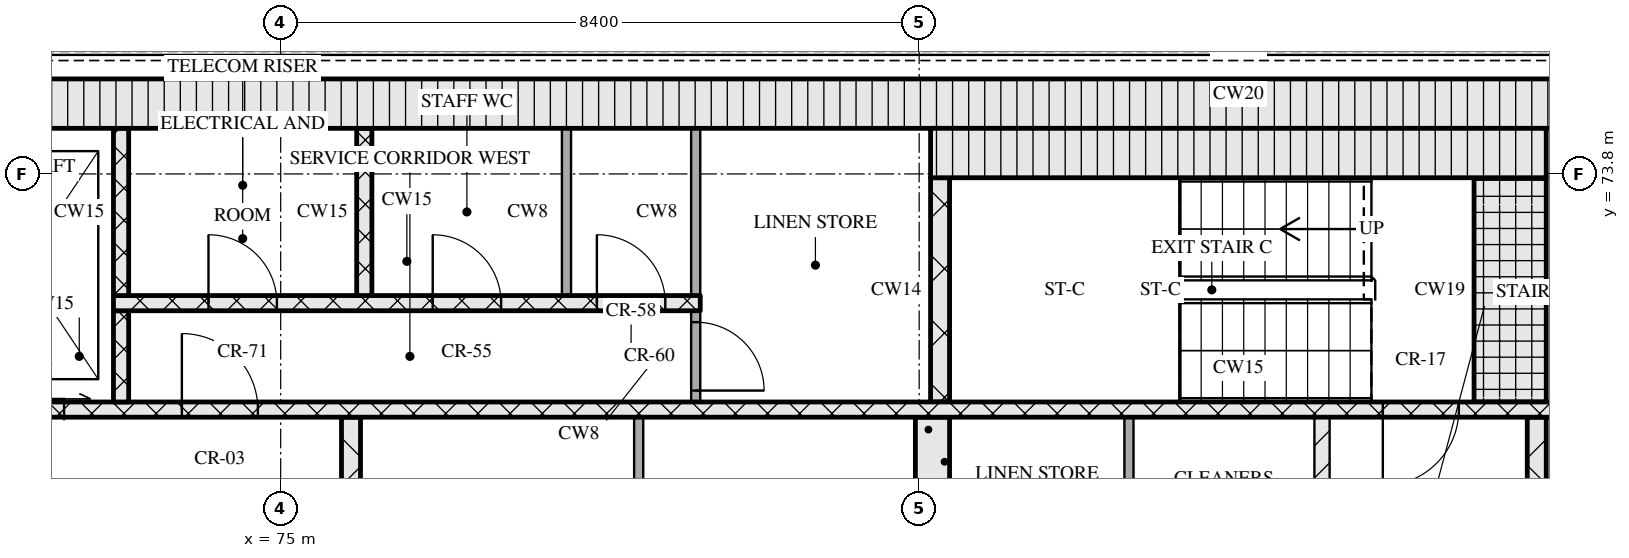
"""IFC4 building model, lengths in metres.
Left out: names, types, materials, properties, quantities, classifications, styles, units other than length and angle.
Written with IfcOpenShell. Run it as: python <this file> out.ifc"""

import sys

from ifc_helpers import new_model, si_unit, direction, frame, frame_2d, origin, place, context, subcontext, project, spatial, rectangle, extrude, element, fill, save


model = new_model("IFC4")
c1 = context("Model", 3, precision=1e-05, world=origin(), true_north=direction((0.0, 1.0)))
c2 = subcontext(c1, "Body", "Model", "MODEL_VIEW")
j1 = project(units=[si_unit("LENGTHUNIT", "METRE"), si_unit("PLANEANGLEUNIT", "RADIAN")], contexts=[c1])
p1 = place(None, origin())
s1 = spatial("IfcSite", under=j1, at=p1, CompositionType="ELEMENT")
p2 = place(p1, origin())
s2 = spatial("IfcBuilding", under=s1, at=p2, CompositionType="ELEMENT")
p3 = place(p2, frame((0.0, 0.0, 234.3)))
s3 = spatial("IfcBuildingStorey", under=s2, at=p3, CompositionType="ELEMENT", Elevation=234.3)
p4 = place(p3, frame((67.15, 74.725, 0.0), z_axis=(0.0, 0.0, 1.0), x_axis=(1.0, 0.0, 0.0)))
e1 = element("IfcWall", 1, at=p4, inside=s3, PredefinedType="SOLIDWALL", context=c2, shape_type="SweptSolid", body=[
    extrude(rectangle(XDim=40.9, YDim=0.65, at=frame_2d((20.45, 0.0))), origin(), (0.0, 0.0, 1.0), 3.32),
])
p5 = place(p3, frame((79.71, 68.0, 0.0), z_axis=(0.0, 0.0, 1.0), x_axis=(0.0, 1.0, 0.0)))
e2 = element("IfcWall", 2, at=p5, inside=s3, PredefinedType="PARTITIONING", context=c2, shape_type="SweptSolid", body=[
    extrude(rectangle(XDim=2.6, YDim=0.12, at=frame_2d((1.3, 0.0))), origin(), (0.0, 0.0, 1.0), 3.32),
])
p6 = place(p3, frame((83.575, 68.0, 0.0), z_axis=(0.0, 0.0, 1.0), x_axis=(0.0, 1.0, 0.0)))
e3 = element("IfcWall", 3, at=p6, inside=s3, PredefinedType="SOLIDWALL", context=c2, shape_type="SweptSolid", body=[
    extrude(rectangle(XDim=2.6, YDim=0.45, at=frame_2d((1.3, 0.0))), origin(), (0.0, 0.0, 1.0), 3.32),
])
p7 = place(p3, frame((86.16, 68.0, 0.0), z_axis=(0.0, 0.0, 1.0), x_axis=(0.0, 1.0, 0.0)))
e4 = element("IfcWall", 4, at=p7, inside=s3, PredefinedType="PARTITIONING", context=c2, shape_type="SweptSolid", body=[
    extrude(rectangle(XDim=2.6, YDim=0.12, at=frame_2d((1.3, 0.0))), origin(), (0.0, 0.0, 1.0), 3.32),
])
p8 = place(p3, frame((88.7, 68.0, 0.0), z_axis=(0.0, 0.0, 1.0), x_axis=(0.0, 1.0, 0.0)))
e5 = element("IfcWall", 5, at=p8, inside=s3, PredefinedType="PARTITIONING", context=c2, shape_type="SweptSolid", body=[
    extrude(rectangle(XDim=2.6, YDim=0.2, at=frame_2d((1.3, 0.0))), origin(), (0.0, 0.0, 1.0), 3.32),
])
p9 = place(p3, frame((91.525, 68.0, 0.0), z_axis=(0.0, 0.0, 1.0), x_axis=(0.0, 1.0, 0.0)))
e6 = element("IfcWall", 6, at=p9, inside=s3, PredefinedType="SOLIDWALL", context=c2, shape_type="SweptSolid", body=[
    extrude(rectangle(XDim=2.6, YDim=0.25, at=frame_2d((1.3, 0.0))), origin(), (0.0, 0.0, 1.0), 3.32),
])
p10 = place(p3, frame((75.925, 68.3, 0.0), z_axis=(0.0, 0.0, 1.0), x_axis=(0.0, 1.0, 0.0)))
e7 = element("IfcWall", 7, at=p10, inside=s3, PredefinedType="SOLIDWALL", context=c2, shape_type="SweptSolid", body=[
    extrude(rectangle(XDim=2.3, YDim=0.25, at=frame_2d((1.15, 0.0))), origin(), (0.0, 0.0, 1.0), 3.32),
])
p11 = place(p3, frame((67.8, 70.7, 0.0), z_axis=(0.0, 0.0, 1.0), x_axis=(1.0, 0.0, 0.0)))
e8 = element("IfcWall", 8, at=p11, inside=s3, PredefinedType="SOLIDWALL", context=c2, shape_type="SweptSolid", body=[
    extrude(rectangle(XDim=39.6, YDim=0.2, at=frame_2d((19.8, 0.0))), origin(), (0.0, 0.0, 1.0), 3.32),
])
p12 = place(p11, frame((0.65, 0.0, 0.0)))
e9 = element("IfcOpeningElement", 9, at=p12, cuts=e8, PredefinedType="OPENING", context=c2, shape_type="SweptSolid", body=[
    extrude(rectangle(XDim=1.1, YDim=2.1, at=frame_2d((0.55, 1.05))), frame((0.0, 0.11, 0.0), z_axis=(0.0, -1.0, 0.0), x_axis=(1.0, 0.0, 0.0)), (0.0, 0.0, 1.0), 0.22),
])
p13 = place(p11, frame((3.25, 0.0, 0.0)))
e10 = element("IfcOpeningElement", 10, at=p13, cuts=e8, PredefinedType="OPENING", context=c2, shape_type="SweptSolid", body=[
    extrude(rectangle(XDim=1.1, YDim=2.1, at=frame_2d((0.55, 1.05))), frame((0.0, 0.11, 0.0), z_axis=(0.0, -1.0, 0.0), x_axis=(1.0, 0.0, 0.0)), (0.0, 0.0, 1.0), 0.22),
])
p14 = place(p11, frame((5.9, 0.0, 0.0)))
e11 = element("IfcOpeningElement", 11, at=p14, cuts=e8, PredefinedType="OPENING", context=c2, shape_type="SweptSolid", body=[
    extrude(rectangle(XDim=1.0, YDim=2.1, at=frame_2d((0.5, 1.05))), frame((0.0, 0.11, 0.0), z_axis=(0.0, -1.0, 0.0), x_axis=(1.0, 0.0, 0.0)), (0.0, 0.0, 1.0), 0.22),
])
p15 = place(p11, frame((21.7, 0.0, 0.0)))
e12 = element("IfcOpeningElement", 12, at=p15, cuts=e8, PredefinedType="OPENING", context=c2, shape_type="SweptSolid", body=[
    extrude(rectangle(XDim=1.0, YDim=2.1, at=frame_2d((0.5, 1.05))), frame((0.0, 0.11, 0.0), z_axis=(0.0, -1.0, 0.0), x_axis=(1.0, 0.0, 0.0)), (0.0, 0.0, 1.0), 0.22),
])
p16 = place(p11, frame((32.7, 0.0, 0.0)))
e13 = element("IfcOpeningElement", 13, at=p16, cuts=e8, PredefinedType="OPENING", context=c2, shape_type="SweptSolid", body=[
    extrude(rectangle(XDim=1.0, YDim=2.1, at=frame_2d((0.5, 1.05))), frame((0.0, 0.11, 0.0), z_axis=(0.0, -1.0, 0.0), x_axis=(1.0, 0.0, 0.0)), (0.0, 0.0, 1.0), 0.22),
])
p17 = place(p11, frame((35.25, 0.0, 0.0)))
e14 = element("IfcOpeningElement", 14, at=p17, cuts=e8, PredefinedType="OPENING", context=c2, shape_type="SweptSolid", body=[
    extrude(rectangle(XDim=1.1, YDim=2.1, at=frame_2d((0.55, 1.05))), frame((0.0, 0.11, 0.0), z_axis=(0.0, -1.0, 0.0), x_axis=(1.0, 0.0, 0.0)), (0.0, 0.0, 1.0), 0.22),
])
p18 = place(p11, frame((37.85, 0.0, 0.0)))
e15 = element("IfcOpeningElement", 15, at=p18, cuts=e8, PredefinedType="OPENING", context=c2, shape_type="SweptSolid", body=[
    extrude(rectangle(XDim=1.1, YDim=2.1, at=frame_2d((0.55, 1.05))), frame((0.0, 0.11, 0.0), z_axis=(0.0, -1.0, 0.0), x_axis=(1.0, 0.0, 0.0)), (0.0, 0.0, 1.0), 0.22),
])
p19 = place(p3, frame((72.9, 70.8, 0.0), z_axis=(0.0, 0.0, 1.0), x_axis=(0.0, 1.0, 0.0)))
e16 = element("IfcWall", 16, at=p19, inside=s3, PredefinedType="SOLIDWALL", context=c2, shape_type="SweptSolid", body=[
    extrude(rectangle(XDim=1.2, YDim=0.2, at=frame_2d((0.6, 0.0))), origin(), (0.0, 0.0, 1.0), 3.32),
])
p20 = place(p3, frame((80.46, 70.8, 0.0), z_axis=(0.0, 0.0, 1.0), x_axis=(0.0, 1.0, 0.0)))
e17 = element("IfcWall", 17, at=p20, inside=s3, PredefinedType="PARTITIONING", context=c2, shape_type="SweptSolid", body=[
    extrude(rectangle(XDim=1.2, YDim=0.12, at=frame_2d((0.6, 0.0))), origin(), (0.0, 0.0, 1.0), 3.32),
])
p21 = place(p20, frame((0.15, 0.0, 0.0)))
e18 = element("IfcOpeningElement", 18, at=p21, cuts=e17, PredefinedType="OPENING", context=c2, shape_type="SweptSolid", body=[
    extrude(rectangle(XDim=0.9, YDim=2.1, at=frame_2d((0.45, 1.05))), frame((0.0, 0.07, 0.0), z_axis=(0.0, -1.0, 0.0), x_axis=(1.0, 0.0, 0.0)), (0.0, 0.0, 1.0), 0.14),
])
p22 = place(p3, frame((83.675, 70.8, 0.0), z_axis=(0.0, 0.0, 1.0), x_axis=(0.0, 1.0, 0.0)))
e19 = element("IfcWall", 19, at=p22, inside=s3, PredefinedType="SOLIDWALL", context=c2, shape_type="SweptSolid", body=[
    extrude(rectangle(XDim=2.95, YDim=0.25, at=frame_2d((1.475, 0.0))), origin(), (0.0, 0.0, 1.0), 3.32),
])
p23 = place(p3, frame((91.175, 70.8, 0.0), z_axis=(0.0, 0.0, 1.0), x_axis=(0.0, 1.0, 0.0)))
e20 = element("IfcWall", 20, at=p23, inside=s3, PredefinedType="SOLIDWALL", context=c2, shape_type="SweptSolid", body=[
    extrude(rectangle(XDim=2.95, YDim=0.95, at=frame_2d((1.475, 0.0))), origin(), (0.0, 0.0, 1.0), 3.32),
])
p24 = place(p3, frame((72.8, 72.1, 0.0), z_axis=(0.0, 0.0, 1.0), x_axis=(1.0, 0.0, 0.0)))
e21 = element("IfcWall", 21, at=p24, inside=s3, PredefinedType="SOLIDWALL", context=c2, shape_type="SweptSolid", body=[
    extrude(rectangle(XDim=7.72, YDim=0.2, at=frame_2d((3.86, 0.0))), origin(), (0.0, 0.0, 1.0), 3.32),
])
p25 = place(p24, frame((1.25, 0.0, 0.0)))
e22 = element("IfcOpeningElement", 22, at=p25, cuts=e21, PredefinedType="OPENING", context=c2, shape_type="SweptSolid", body=[
    extrude(rectangle(XDim=0.9, YDim=2.1, at=frame_2d((0.45, 1.05))), frame((0.0, 0.11, 0.0), z_axis=(0.0, -1.0, 0.0), x_axis=(1.0, 0.0, 0.0)), (0.0, 0.0, 1.0), 0.22),
])
p26 = place(p24, frame((4.2, 0.0, 0.0)))
e23 = element("IfcOpeningElement", 23, at=p26, cuts=e21, PredefinedType="OPENING", context=c2, shape_type="SweptSolid", body=[
    extrude(rectangle(XDim=0.9, YDim=2.1, at=frame_2d((0.45, 1.05))), frame((0.0, 0.11, 0.0), z_axis=(0.0, -1.0, 0.0), x_axis=(1.0, 0.0, 0.0)), (0.0, 0.0, 1.0), 0.22),
])
p27 = place(p24, frame((6.36, 0.0, 0.0)))
e24 = element("IfcOpeningElement", 24, at=p27, cuts=e21, PredefinedType="OPENING", context=c2, shape_type="SweptSolid", body=[
    extrude(rectangle(XDim=0.9, YDim=2.1, at=frame_2d((0.45, 1.05))), frame((0.0, 0.11, 0.0), z_axis=(0.0, -1.0, 0.0), x_axis=(1.0, 0.0, 0.0)), (0.0, 0.0, 1.0), 0.22),
])
for number, where, z_axis, x_axis in (
    (25, (72.9, 72.2, 0.0), (0.0, 0.0, 1.0), (0.0, 1.0, 0.0)),
    (26, (76.1, 72.2, 0.0), (0.0, 0.0, 1.0), (0.0, 1.0, 0.0)),
):
    element("IfcWall", number, at=place(p3, frame(where, z_axis=z_axis, x_axis=x_axis)), inside=s3, PredefinedType="SOLIDWALL", context=c2, shape_type="SweptSolid", body=[
        extrude(rectangle(XDim=2.2, YDim=0.2, at=frame_2d((1.1, 0.0))), origin(), (0.0, 0.0, 1.0), 3.32),
    ])
for number, where, z_axis, x_axis in (
    (27, (78.76, 72.2, 0.0), (0.0, 0.0, 1.0), (0.0, 1.0, 0.0)),
    (28, (80.46, 72.2, 0.0), (0.0, 0.0, 1.0), (0.0, 1.0, 0.0)),
):
    element("IfcWall", number, at=place(p3, frame(where, z_axis=z_axis, x_axis=x_axis)), inside=s3, PredefinedType="PARTITIONING", context=c2, shape_type="SweptSolid", body=[
        extrude(rectangle(XDim=2.2, YDim=0.12, at=frame_2d((1.1, 0.0))), origin(), (0.0, 0.0, 1.0), 3.32),
    ])
p28 = place(p3, frame((83.55, 74.075, 0.0), z_axis=(0.0, 0.0, 1.0), x_axis=(1.0, 0.0, 0.0)))
e29 = element("IfcWall", 29, at=p28, inside=s3, PredefinedType="SOLIDWALL", context=c2, shape_type="SweptSolid", body=[
    extrude(rectangle(XDim=8.1, YDim=0.65, at=frame_2d((4.05, 0.0))), origin(), (0.0, 0.0, 1.0), 3.32),
])
p29 = place(p13, origin())
e30 = element("IfcDoor", 30, at=p29, inside=s3, OperationType="SLIDING_TO_RIGHT", PredefinedType="DOOR", context=c2, shape_type="SweptSolid", body=[
    extrude(rectangle(XDim=1.1, YDim=2.1, at=frame_2d((0.55, 1.05))), frame((0.0, 0.025, 0.0), z_axis=(0.0, -1.0, 0.0), x_axis=(1.0, 0.0, 0.0)), (0.0, 0.0, 1.0), 0.05),
])
fill(e10, e30)
p30 = place(p14, origin())
e31 = element("IfcDoor", 31, at=p30, inside=s3, OperationType="SINGLE_SWING_LEFT", PredefinedType="DOOR", context=c2, shape_type="SweptSolid", body=[
    extrude(rectangle(XDim=1.0, YDim=2.1, at=frame_2d((0.5, 1.05))), frame((0.0, 0.025, 0.0), z_axis=(0.0, -1.0, 0.0), x_axis=(1.0, 0.0, 0.0)), (0.0, 0.0, 1.0), 0.05),
])
fill(e11, e31)
p31 = place(p15, origin())
e32 = element("IfcDoor", 32, at=p31, inside=s3, OperationType="SINGLE_SWING_RIGHT", PredefinedType="DOOR", context=c2, shape_type="SweptSolid", body=[
    extrude(rectangle(XDim=1.0, YDim=2.1, at=frame_2d((0.5, 1.05))), frame((0.0, 0.025, 0.0), z_axis=(0.0, -1.0, 0.0), x_axis=(1.0, 0.0, 0.0)), (0.0, 0.0, 1.0), 0.05),
])
fill(e12, e32)
p32 = place(p21, origin())
e33 = element("IfcDoor", 33, at=p32, inside=s3, OperationType="SINGLE_SWING_RIGHT", PredefinedType="DOOR", context=c2, shape_type="SweptSolid", body=[
    extrude(rectangle(XDim=0.9, YDim=2.1, at=frame_2d((0.45, 1.05))), frame((0.0, 0.025, 0.0), z_axis=(0.0, -1.0, 0.0), x_axis=(1.0, 0.0, 0.0)), (0.0, 0.0, 1.0), 0.05),
])
fill(e18, e33)
p33 = place(p25, origin())
e34 = element("IfcDoor", 34, at=p33, inside=s3, OperationType="SINGLE_SWING_LEFT", PredefinedType="DOOR", context=c2, shape_type="SweptSolid", body=[
    extrude(rectangle(XDim=0.9, YDim=2.1, at=frame_2d((0.45, 1.05))), frame((0.0, 0.025, 0.0), z_axis=(0.0, -1.0, 0.0), x_axis=(1.0, 0.0, 0.0)), (0.0, 0.0, 1.0), 0.05),
])
fill(e22, e34)
p34 = place(p26, origin())
e35 = element("IfcDoor", 35, at=p34, inside=s3, OperationType="SINGLE_SWING_LEFT", PredefinedType="DOOR", context=c2, shape_type="SweptSolid", body=[
    extrude(rectangle(XDim=0.9, YDim=2.1, at=frame_2d((0.45, 1.05))), frame((0.0, 0.025, 0.0), z_axis=(0.0, -1.0, 0.0), x_axis=(1.0, 0.0, 0.0)), (0.0, 0.0, 1.0), 0.05),
])
fill(e23, e35)
p35 = place(p27, origin())
e36 = element("IfcDoor", 36, at=p35, inside=s3, OperationType="SINGLE_SWING_LEFT", PredefinedType="DOOR", context=c2, shape_type="SweptSolid", body=[
    extrude(rectangle(XDim=0.9, YDim=2.1, at=frame_2d((0.45, 1.05))), frame((0.0, 0.025, 0.0), z_axis=(0.0, -1.0, 0.0), x_axis=(1.0, 0.0, 0.0)), (0.0, 0.0, 1.0), 0.05),
])
fill(e24, e36)
save(model, sys.argv[1])
